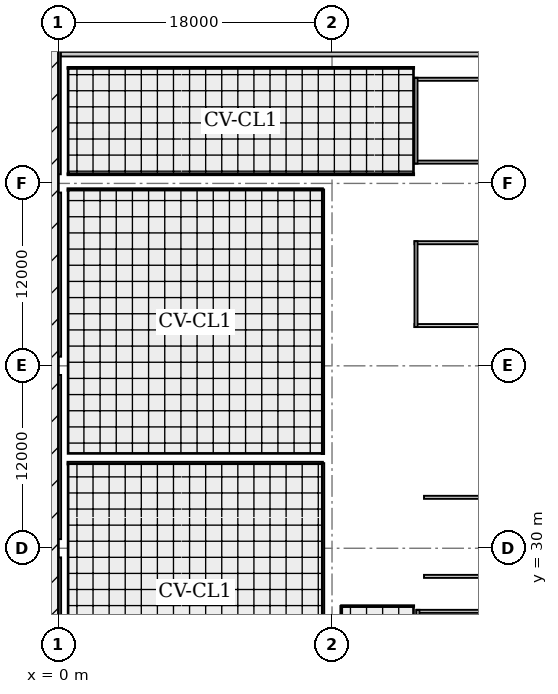
"""IFC4 building model, lengths in metres.
Left out: names, types, materials, properties, quantities, classifications, styles, units other than length and angle.
Written with IfcOpenShell. Run it as: python <this file> out.ifc"""

import sys

from ifc_helpers import new_model, si_unit, direction, frame, frame_2d, origin, origin_2d, place, context, subcontext, project, spatial, rectangle, circle, extrude, element, fill, save


model = new_model("IFC4")
c1 = context("Model", 3, precision=1e-05, world=origin(), true_north=direction((0.0, 1.0)))
c2 = subcontext(c1, "Body", "Model", "MODEL_VIEW")
j1 = project(units=[si_unit("LENGTHUNIT", "METRE"), si_unit("PLANEANGLEUNIT", "RADIAN")], contexts=[c1])
p1 = place(None, origin())
s1 = spatial("IfcSite", under=j1, at=p1, CompositionType="ELEMENT")
p2 = place(p1, origin())
s2 = spatial("IfcBuilding", under=s1, at=p2, CompositionType="ELEMENT")
p3 = place(p2, origin())
s3 = spatial("IfcBuildingStorey", under=s2, at=p3, CompositionType="ELEMENT", Elevation=0.0)
for number, where, z_axis, x_axis in (
    (1, (0.0, 30.0, 0.0), (0.0, 0.0, 1.0), (1.0, 0.0, 0.0)),
    (2, (0.0, 36.0, 0.0), (0.0, 0.0, 1.0), (1.0, 0.0, 0.0)),
    (3, (0.0, 42.0, 0.0), (0.0, 0.0, 1.0), (1.0, 0.0, 0.0)),
    (4, (0.0, 54.0, 0.0), (0.0, 0.0, 1.0), (1.0, 0.0, 0.0)),
):
    element("IfcColumn", number, at=place(p3, frame(where, z_axis=z_axis, x_axis=x_axis)), inside=s3, PredefinedType="COLUMN", context=c2, shape_type="SweptSolid", body=[
        extrude(rectangle(XDim=1.6, YDim=1.2, at=origin_2d()), origin(), (0.0, 0.0, 1.0), 6.6),
    ])
for number, where, z_axis, x_axis in (
    (5, (18.0, 30.0, 0.0), (0.0, 0.0, 1.0), (1.0, 0.0, 0.0)),
    (6, (18.0, 36.0, 0.0), (0.0, 0.0, 1.0), (1.0, 0.0, 0.0)),
    (7, (18.0, 42.0, 0.0), (0.0, 0.0, 1.0), (1.0, 0.0, 0.0)),
    (8, (18.0, 54.0, 0.0), (0.0, 0.0, 1.0), (1.0, 0.0, 0.0)),
):
    element("IfcColumn", number, at=place(p3, frame(where, z_axis=z_axis, x_axis=x_axis)), inside=s3, PredefinedType="COLUMN", context=c2, shape_type="SweptSolid", body=[
        extrude(circle(Radius=0.45, at=origin_2d()), origin(), (0.0, 0.0, 1.0), 6.6),
    ])
p4 = place(p3, frame((0.15, 62.5, -1.25), z_axis=(0.0, 0.0, 1.0), x_axis=(0.0, 1.0, 0.0)))
e9 = element("IfcWall", 9, at=p4, inside=s3, PredefinedType="SOLIDWALL", context=c2, shape_type="SweptSolid", body=[
    extrude(rectangle(XDim=4.0, YDim=0.3, at=frame_2d((2.0, 0.0))), origin(), (0.0, 0.0, 1.0), 1.23),
])
p5 = place(p3, frame((0.15, 62.5, -1.25), z_axis=(0.0, 0.0, 1.0), x_axis=(1.0, 0.0, 0.0)))
e10 = element("IfcWall", 10, at=p5, inside=s3, PredefinedType="SOLIDWALL", context=c2, shape_type="SweptSolid", body=[
    extrude(rectangle(XDim=125.7, YDim=0.3, at=frame_2d((62.85, 0.0))), origin(), (0.0, 0.0, 1.0), 0.87),
])
p6 = place(p3, frame((0.0, 18.6, 0.0), z_axis=(0.0, 0.0, 1.0), x_axis=(0.0, 1.0, 0.0)))
e11 = element("IfcWall", 11, at=p6, inside=s3, PredefinedType="SOLIDWALL", context=c2, shape_type="SweptSolid", body=[
    extrude(rectangle(XDim=10.8, YDim=0.36, at=frame_2d((5.4, 0.0))), origin(), (0.0, 0.0, 1.0), 5.67),
])
p7 = place(p6, frame((2.467, 0.0, 0.0)))
e12 = element("IfcOpeningElement", 12, at=p7, cuts=e11, PredefinedType="OPENING", context=c2, shape_type="SweptSolid", body=[
    extrude(rectangle(XDim=2.4, YDim=2.5, at=frame_2d((1.2, 1.25))), frame((0.0, 0.19, 0.0), z_axis=(0.0, -1.0, 0.0), x_axis=(1.0, 0.0, 0.0)), (0.0, 0.0, 1.0), 0.38),
])
p8 = place(p6, frame((5.933, 0.0, 0.95)))
e13 = element("IfcOpeningElement", 13, at=p8, cuts=e11, PredefinedType="OPENING", context=c2, shape_type="SweptSolid", body=[
    extrude(rectangle(XDim=2.4, YDim=2.1, at=frame_2d((1.2, 1.05))), frame((0.0, 0.19, 0.0), z_axis=(0.0, -1.0, 0.0), x_axis=(1.0, 0.0, 0.0)), (0.0, 0.0, 1.0), 0.38),
])
p9 = place(p3, frame((0.0, 30.6, 0.0), z_axis=(0.0, 0.0, 1.0), x_axis=(0.0, 1.0, 0.0)))
e14 = element("IfcWall", 14, at=p9, inside=s3, PredefinedType="SOLIDWALL", context=c2, shape_type="SweptSolid", body=[
    extrude(rectangle(XDim=10.8, YDim=0.36, at=frame_2d((5.4, 0.0))), origin(), (0.0, 0.0, 1.0), 6.225),
])
p10 = place(p9, frame((1.367, 0.0, 0.0)))
e15 = element("IfcOpeningElement", 15, at=p10, cuts=e14, PredefinedType="OPENING", context=c2, shape_type="SweptSolid", body=[
    extrude(rectangle(XDim=2.2, YDim=2.45, at=frame_2d((1.1, 1.225))), frame((0.0, 0.19, 0.0), z_axis=(0.0, -1.0, 0.0), x_axis=(1.0, 0.0, 0.0)), (0.0, 0.0, 1.0), 0.38),
])
p11 = place(p9, frame((6.683, 0.0, 0.95)))
e16 = element("IfcOpeningElement", 16, at=p11, cuts=e14, PredefinedType="OPENING", context=c2, shape_type="SweptSolid", body=[
    extrude(rectangle(XDim=2.1, YDim=2.0, at=frame_2d((1.05, 1.0))), frame((0.0, 0.19, 0.0), z_axis=(0.0, -1.0, 0.0), x_axis=(1.0, 0.0, 0.0)), (0.0, 0.0, 1.0), 0.38),
])
p12 = place(p3, frame((0.0, 42.6, 0.0), z_axis=(0.0, 0.0, 1.0), x_axis=(0.0, 1.0, 0.0)))
e17 = element("IfcWall", 17, at=p12, inside=s3, PredefinedType="SOLIDWALL", context=c2, shape_type="SweptSolid", body=[
    extrude(rectangle(XDim=10.8, YDim=0.36, at=frame_2d((5.4, 0.0))), origin(), (0.0, 0.0, 1.0), 6.225),
])
p13 = place(p12, frame((2.567, 0.0, 0.0)))
e18 = element("IfcOpeningElement", 18, at=p13, cuts=e17, PredefinedType="OPENING", context=c2, shape_type="SweptSolid", body=[
    extrude(rectangle(XDim=2.2, YDim=2.45, at=frame_2d((1.1, 1.225))), frame((0.0, 0.19, 0.0), z_axis=(0.0, -1.0, 0.0), x_axis=(1.0, 0.0, 0.0)), (0.0, 0.0, 1.0), 0.38),
])
p14 = place(p12, frame((6.233, 0.0, 0.95)))
e19 = element("IfcOpeningElement", 19, at=p14, cuts=e17, PredefinedType="OPENING", context=c2, shape_type="SweptSolid", body=[
    extrude(rectangle(XDim=1.8, YDim=2.0, at=frame_2d((0.9, 1.0))), frame((0.0, 0.19, 0.0), z_axis=(0.0, -1.0, 0.0), x_axis=(1.0, 0.0, 0.0)), (0.0, 0.0, 1.0), 0.38),
])
p15 = place(p3, frame((0.0, 54.6, 0.0), z_axis=(0.0, 0.0, 1.0), x_axis=(0.0, 1.0, 0.0)))
e20 = element("IfcWall", 20, at=p15, inside=s3, PredefinedType="SOLIDWALL", context=c2, shape_type="SweptSolid", body=[
    extrude(rectangle(XDim=12.3, YDim=0.32, at=frame_2d((6.15, 0.0))), origin(), (0.0, 0.0, 1.0), 5.495),
])
p16 = place(p15, frame((3.167, 0.0, 0.0)))
e21 = element("IfcOpeningElement", 21, at=p16, cuts=e20, PredefinedType="OPENING", context=c2, shape_type="SweptSolid", body=[
    extrude(rectangle(XDim=2.0, YDim=2.4, at=frame_2d((1.0, 1.2))), frame((0.0, 0.17, 0.0), z_axis=(0.0, -1.0, 0.0), x_axis=(1.0, 0.0, 0.0)), (0.0, 0.0, 1.0), 0.34),
])
p17 = place(p15, frame((7.333, 0.0, 0.95)))
e22 = element("IfcOpeningElement", 22, at=p17, cuts=e20, PredefinedType="OPENING", context=c2, shape_type="SweptSolid", body=[
    extrude(rectangle(XDim=1.6, YDim=1.9, at=frame_2d((0.8, 0.95))), frame((0.0, 0.17, 0.0), z_axis=(0.0, -1.0, 0.0), x_axis=(1.0, 0.0, 0.0)), (0.0, 0.0, 1.0), 0.34),
])
for number, where, z_axis, x_axis in (
    (23, (23.425, 55.4, 0.0), (0.0, 0.0, 1.0), (1.0, 0.0, 0.0)),
    (24, (35.25, 60.85, 0.0), (0.0, 0.0, 1.0), (-1.0, 0.0, 0.0)),
):
    element("IfcWall", number, at=place(p3, frame(where, z_axis=z_axis, x_axis=x_axis)), inside=s3, PredefinedType="SOLIDWALL", context=c2, shape_type="SweptSolid", body=[
        extrude(rectangle(XDim=11.825, YDim=0.2, at=frame_2d((5.913, 0.0))), origin(), (0.0, 0.0, 1.0), 6.32),
    ])
p18 = place(p3, frame((23.525, 60.95, 0.0), z_axis=(0.0, 0.0, 1.0), x_axis=(0.0, -1.0, 0.0)))
e25 = element("IfcWall", 25, at=p18, inside=s3, PredefinedType="SOLIDWALL", context=c2, shape_type="SweptSolid", body=[
    extrude(rectangle(XDim=5.65, YDim=0.2, at=frame_2d((2.825, 0.0))), origin(), (0.0, 0.0, 1.0), 4.4),
])
p19 = place(p18, frame((2.025, 0.0, 0.0)))
e26 = element("IfcOpeningElement", 26, at=p19, cuts=e25, PredefinedType="OPENING", context=c2, shape_type="SweptSolid", body=[
    extrude(rectangle(XDim=1.6, YDim=2.15, at=frame_2d((0.8, 1.075))), frame((0.0, 0.11, 0.0), z_axis=(0.0, -1.0, 0.0), x_axis=(1.0, 0.0, 0.0)), (0.0, 0.0, 1.0), 0.22),
])
p20 = place(p3, frame((35.125, 25.85, 0.0), z_axis=(0.0, 0.0, 1.0), x_axis=(-1.0, 0.0, 0.0)))
e27 = element("IfcWall", 27, at=p20, inside=s3, PredefinedType="SOLIDWALL", context=c2, shape_type="SweptSolid", body=[
    extrude(rectangle(XDim=11.575, YDim=0.2, at=frame_2d((5.788, 0.0))), origin(), (0.0, 0.0, 1.0), 6.32),
])
p21 = place(p3, frame((23.65, 25.95, 0.0), z_axis=(0.0, 0.0, 1.0), x_axis=(0.0, -1.0, 0.0)))
e28 = element("IfcWall", 28, at=p21, inside=s3, PredefinedType="SOLIDWALL", context=c2, shape_type="SweptSolid", body=[
    extrude(rectangle(XDim=5.4, YDim=0.2, at=frame_2d((2.7, 0.0))), origin(), (0.0, 0.0, 1.0), 4.4),
])
p22 = place(p21, frame((1.9, 0.0, 0.0)))
e29 = element("IfcOpeningElement", 29, at=p22, cuts=e28, PredefinedType="OPENING", context=c2, shape_type="SweptSolid", body=[
    extrude(rectangle(XDim=1.6, YDim=2.15, at=frame_2d((0.8, 1.075))), frame((0.0, 0.11, 0.0), z_axis=(0.0, -1.0, 0.0), x_axis=(1.0, 0.0, 0.0)), (0.0, 0.0, 1.0), 0.22),
])
for number, where, z_axis, x_axis in (
    (30, (23.425, 44.65, 0.0), (0.0, 0.0, 1.0), (1.0, 0.0, 0.0)),
    (31, (35.25, 50.1, 0.0), (0.0, 0.0, 1.0), (-1.0, 0.0, 0.0)),
):
    element("IfcWall", number, at=place(p3, frame(where, z_axis=z_axis, x_axis=x_axis)), inside=s3, PredefinedType="SOLIDWALL", context=c2, shape_type="SweptSolid", body=[
        extrude(rectangle(XDim=11.825, YDim=0.2, at=frame_2d((5.913, 0.0))), origin(), (0.0, 0.0, 1.0), 6.32),
    ])
p23 = place(p3, frame((23.525, 50.2, 0.0), z_axis=(0.0, 0.0, 1.0), x_axis=(0.0, -1.0, 0.0)))
e32 = element("IfcWall", 32, at=p23, inside=s3, PredefinedType="SOLIDWALL", context=c2, shape_type="SweptSolid", body=[
    extrude(rectangle(XDim=5.65, YDim=0.2, at=frame_2d((2.825, 0.0))), origin(), (0.0, 0.0, 1.0), 4.4),
])
p24 = place(p23, frame((2.025, 0.0, 0.0)))
e33 = element("IfcOpeningElement", 33, at=p24, cuts=e32, PredefinedType="OPENING", context=c2, shape_type="SweptSolid", body=[
    extrude(rectangle(XDim=1.6, YDim=2.15, at=frame_2d((0.8, 1.075))), frame((0.0, 0.11, 0.0), z_axis=(0.0, -1.0, 0.0), x_axis=(1.0, 0.0, 0.0)), (0.0, 0.0, 1.0), 0.22),
])
for number, where, z_axis, x_axis in (
    (34, (24.05, 28.15, 0.0), (0.0, 0.0, 1.0), (1.0, 0.0, 0.0)),
    (35, (33.225, 33.35, 0.0), (0.0, 0.0, 1.0), (-1.0, 0.0, 0.0)),
):
    element("IfcWall", number, at=place(p3, frame(where, z_axis=z_axis, x_axis=x_axis)), inside=s3, PredefinedType="SOLIDWALL", context=c2, shape_type="SweptSolid", body=[
        extrude(rectangle(XDim=9.175, YDim=0.2, at=frame_2d((4.587, 0.0))), origin(), (0.0, 0.0, 1.0), 6.32),
    ])
p25 = place(p3, frame((18.6, 26.2, 0.0), z_axis=(0.0, 0.0, 1.0), x_axis=(1.0, 0.0, 0.0)))
e36 = element("IfcWall", 36, at=p25, inside=s3, PredefinedType="PARTITIONING", context=c2, shape_type="SweptSolid", body=[
    extrude(rectangle(XDim=4.8, YDim=0.1, at=frame_2d((2.4, 0.0))), origin(), (0.0, 0.0, 1.0), 4.4),
])
p26 = place(p25, frame((1.65, 0.0, 0.0)))
e37 = element("IfcOpeningElement", 37, at=p26, cuts=e36, PredefinedType="OPENING", context=c2, shape_type="SweptSolid", body=[
    extrude(rectangle(XDim=1.5, YDim=2.15, at=frame_2d((0.75, 1.075))), frame((0.0, 0.06, 0.0), z_axis=(0.0, -1.0, 0.0), x_axis=(1.0, 0.0, 0.0)), (0.0, 0.0, 1.0), 0.12),
])
p27 = place(p3, frame((18.6, 18.4, 0.0), z_axis=(0.0, 0.0, 1.0), x_axis=(0.0, 1.0, 0.0)))
e38 = element("IfcWall", 38, at=p27, inside=s3, PredefinedType="PARTITIONING", context=c2, shape_type="SweptSolid", body=[
    extrude(rectangle(XDim=7.8, YDim=0.1, at=frame_2d((3.9, 0.0))), origin(), (0.0, 0.0, 1.0), 4.4),
])
p28 = place(p3, frame((0.6, 35.6, 0.0), z_axis=(0.0, 0.0, 1.0), x_axis=(1.0, 0.0, 0.0)))
e39 = element("IfcWall", 39, at=p28, inside=s3, PredefinedType="PARTITIONING", context=c2, shape_type="SweptSolid", body=[
    extrude(rectangle(XDim=16.8, YDim=0.175, at=frame_2d((8.4, 0.0))), origin(), (0.0, 0.0, 1.0), 4.4),
])
p29 = place(p3, frame((17.4, 35.6, 0.0), z_axis=(0.0, 0.0, 1.0), x_axis=(0.0, -1.0, 0.0)))
e40 = element("IfcWall", 40, at=p29, inside=s3, PredefinedType="PARTITIONING", context=c2, shape_type="SweptSolid", body=[
    extrude(rectangle(XDim=17.0, YDim=0.175, at=frame_2d((8.5, 0.0))), origin(), (0.0, 0.0, 1.0), 4.4),
])
p30 = place(p29, frame((7.625, 0.0, 0.0)))
e41 = element("IfcOpeningElement", 41, at=p30, cuts=e40, PredefinedType="OPENING", context=c2, shape_type="SweptSolid", body=[
    extrude(rectangle(XDim=1.75, YDim=2.1, at=frame_2d((0.875, 1.05))), frame((0.0, 0.097, 0.0), z_axis=(0.0, -1.0, 0.0), x_axis=(1.0, 0.0, 0.0)), (0.0, 0.0, 1.0), 0.195),
])
p31 = place(p3, frame((0.6, 53.6, 0.0), z_axis=(0.0, 0.0, 1.0), x_axis=(1.0, 0.0, 0.0)))
e42 = element("IfcWall", 42, at=p31, inside=s3, PredefinedType="PARTITIONING", context=c2, shape_type="SweptSolid", body=[
    extrude(rectangle(XDim=16.8, YDim=0.16, at=frame_2d((8.4, 0.0))), origin(), (0.0, 0.0, 1.0), 4.4),
])
p32 = place(p3, frame((17.4, 53.6, 0.0), z_axis=(0.0, 0.0, 1.0), x_axis=(0.0, -1.0, 0.0)))
e43 = element("IfcWall", 43, at=p32, inside=s3, PredefinedType="PARTITIONING", context=c2, shape_type="SweptSolid", body=[
    extrude(rectangle(XDim=17.4, YDim=0.16, at=frame_2d((8.7, 0.0))), origin(), (0.0, 0.0, 1.0), 4.4),
])
p33 = place(p32, frame((7.825, 0.0, 0.0)))
e44 = element("IfcOpeningElement", 44, at=p33, cuts=e43, PredefinedType="OPENING", context=c2, shape_type="SweptSolid", body=[
    extrude(rectangle(XDim=1.75, YDim=2.1, at=frame_2d((0.875, 1.05))), frame((0.0, 0.09, 0.0), z_axis=(0.0, -1.0, 0.0), x_axis=(1.0, 0.0, 0.0)), (0.0, 0.0, 1.0), 0.18),
])
for number, where, z_axis, x_axis in (
    (45, (23.4, 54.6, 0.0), (0.0, 0.0, 1.0), (-1.0, 0.0, 0.0)),
    (46, (0.6, 61.6, 0.0), (0.0, 0.0, 1.0), (1.0, 0.0, 0.0)),
):
    element("IfcWall", number, at=place(p3, frame(where, z_axis=z_axis, x_axis=x_axis)), inside=s3, PredefinedType="PARTITIONING", context=c2, shape_type="SweptSolid", body=[
        extrude(rectangle(XDim=22.8, YDim=0.12, at=frame_2d((11.4, 0.0))), origin(), (0.0, 0.0, 1.0), 4.4),
    ])
p34 = place(p8, origin())
e47 = element("IfcWindow", 47, at=p34, inside=s3, PartitioningType="SINGLE_PANEL", PredefinedType="WINDOW", context=c2, shape_type="SweptSolid", body=[
    extrude(rectangle(XDim=2.4, YDim=2.1, at=frame_2d((1.2, 1.05))), frame((0.0, 0.03, 0.0), z_axis=(0.0, -1.0, 0.0), x_axis=(1.0, 0.0, 0.0)), (0.0, 0.0, 1.0), 0.06),
])
fill(e13, e47)
p35 = place(p10, origin())
e48 = element("IfcDoor", 48, at=p35, inside=s3, OperationType="SINGLE_SWING_RIGHT", PredefinedType="DOOR", context=c2, shape_type="SweptSolid", body=[
    extrude(rectangle(XDim=2.2, YDim=2.45, at=frame_2d((1.1, 1.225))), frame((0.0, 0.025, 0.0), z_axis=(0.0, -1.0, 0.0), x_axis=(1.0, 0.0, 0.0)), (0.0, 0.0, 1.0), 0.05),
])
fill(e15, e48)
p36 = place(p11, origin())
e49 = element("IfcWindow", 49, at=p36, inside=s3, PartitioningType="SINGLE_PANEL", PredefinedType="WINDOW", context=c2, shape_type="SweptSolid", body=[
    extrude(rectangle(XDim=2.1, YDim=2.0, at=frame_2d((1.05, 1.0))), frame((0.0, 0.03, 0.0), z_axis=(0.0, -1.0, 0.0), x_axis=(1.0, 0.0, 0.0)), (0.0, 0.0, 1.0), 0.06),
])
fill(e16, e49)
p37 = place(p13, origin())
e50 = element("IfcDoor", 50, at=p37, inside=s3, OperationType="SINGLE_SWING_LEFT", PredefinedType="DOOR", context=c2, shape_type="SweptSolid", body=[
    extrude(rectangle(XDim=2.2, YDim=2.45, at=frame_2d((1.1, 1.225))), frame((0.0, 0.025, 0.0), z_axis=(0.0, -1.0, 0.0), x_axis=(1.0, 0.0, 0.0)), (0.0, 0.0, 1.0), 0.05),
])
fill(e18, e50)
p38 = place(p14, origin())
e51 = element("IfcWindow", 51, at=p38, inside=s3, PartitioningType="SINGLE_PANEL", PredefinedType="WINDOW", context=c2, shape_type="SweptSolid", body=[
    extrude(rectangle(XDim=1.8, YDim=2.0, at=frame_2d((0.9, 1.0))), frame((0.0, 0.03, 0.0), z_axis=(0.0, -1.0, 0.0), x_axis=(1.0, 0.0, 0.0)), (0.0, 0.0, 1.0), 0.06),
])
fill(e19, e51)
p39 = place(p16, origin())
e52 = element("IfcDoor", 52, at=p39, inside=s3, OperationType="SINGLE_SWING_RIGHT", PredefinedType="DOOR", context=c2, shape_type="SweptSolid", body=[
    extrude(rectangle(XDim=2.0, YDim=2.4, at=frame_2d((1.0, 1.2))), frame((0.0, 0.025, 0.0), z_axis=(0.0, -1.0, 0.0), x_axis=(1.0, 0.0, 0.0)), (0.0, 0.0, 1.0), 0.05),
])
fill(e21, e52)
p40 = place(p17, origin())
e53 = element("IfcWindow", 53, at=p40, inside=s3, PartitioningType="SINGLE_PANEL", PredefinedType="WINDOW", context=c2, shape_type="SweptSolid", body=[
    extrude(rectangle(XDim=1.6, YDim=1.9, at=frame_2d((0.8, 0.95))), frame((0.0, 0.03, 0.0), z_axis=(0.0, -1.0, 0.0), x_axis=(1.0, 0.0, 0.0)), (0.0, 0.0, 1.0), 0.06),
])
fill(e22, e53)
p41 = place(p19, origin())
e54 = element("IfcDoor", 54, at=p41, inside=s3, OperationType="SINGLE_SWING_RIGHT", PredefinedType="DOOR", context=c2, shape_type="SweptSolid", body=[
    extrude(rectangle(XDim=1.6, YDim=2.15, at=frame_2d((0.8, 1.075))), frame((0.0, 0.025, 0.0), z_axis=(0.0, -1.0, 0.0), x_axis=(1.0, 0.0, 0.0)), (0.0, 0.0, 1.0), 0.05),
])
fill(e26, e54)
p42 = place(p24, origin())
e55 = element("IfcDoor", 55, at=p42, inside=s3, OperationType="SINGLE_SWING_RIGHT", PredefinedType="DOOR", context=c2, shape_type="SweptSolid", body=[
    extrude(rectangle(XDim=1.6, YDim=2.15, at=frame_2d((0.8, 1.075))), frame((0.0, 0.025, 0.0), z_axis=(0.0, -1.0, 0.0), x_axis=(1.0, 0.0, 0.0)), (0.0, 0.0, 1.0), 0.05),
])
fill(e33, e55)
p43 = place(p26, origin())
e56 = element("IfcDoor", 56, at=p43, inside=s3, OperationType="SINGLE_SWING_RIGHT", PredefinedType="DOOR", context=c2, shape_type="SweptSolid", body=[
    extrude(rectangle(XDim=1.5, YDim=2.15, at=frame_2d((0.75, 1.075))), frame((0.0, 0.025, 0.0), z_axis=(0.0, -1.0, 0.0), x_axis=(1.0, 0.0, 0.0)), (0.0, 0.0, 1.0), 0.05),
])
fill(e37, e56)
p44 = place(p30, origin())
e57 = element("IfcDoor", 57, at=p44, inside=s3, OperationType="SINGLE_SWING_RIGHT", PredefinedType="DOOR", context=c2, shape_type="SweptSolid", body=[
    extrude(rectangle(XDim=1.75, YDim=2.1, at=frame_2d((0.875, 1.05))), frame((0.0, 0.025, 0.0), z_axis=(0.0, -1.0, 0.0), x_axis=(1.0, 0.0, 0.0)), (0.0, 0.0, 1.0), 0.05),
])
fill(e41, e57)
p45 = place(p33, origin())
e58 = element("IfcDoor", 58, at=p45, inside=s3, OperationType="SINGLE_SWING_LEFT", PredefinedType="DOOR", context=c2, shape_type="SweptSolid", body=[
    extrude(rectangle(XDim=1.75, YDim=2.1, at=frame_2d((0.875, 1.05))), frame((0.0, 0.025, 0.0), z_axis=(0.0, -1.0, 0.0), x_axis=(1.0, 0.0, 0.0)), (0.0, 0.0, 1.0), 0.05),
])
fill(e44, e58)
save(model, sys.argv[1])
